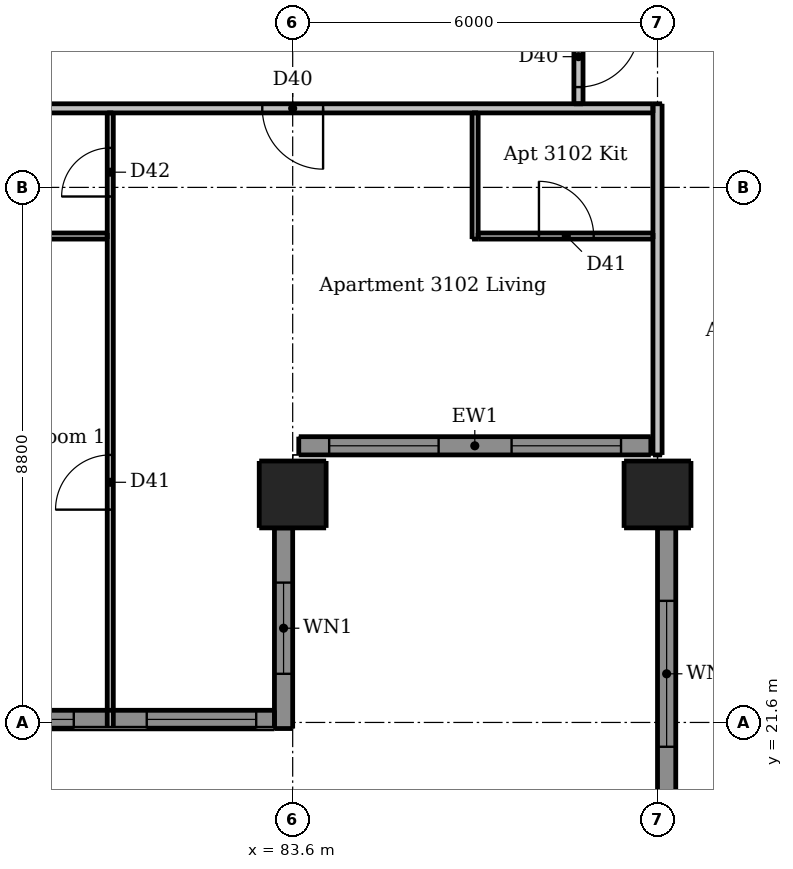
"""IFC4 building model, lengths in metres.
Left out: names, types, materials, properties, quantities, classifications, styles, units other than length and angle.
Written with IfcOpenShell. Run it as: python <this file> out.ifc"""

import sys

from ifc_helpers import new_model, si_unit, direction, frame, frame_2d, origin, origin_2d, place, context, subcontext, project, spatial, rectangle, extrude, element, fill, save


model = new_model("IFC4")
c1 = context("Model", 3, precision=1e-05, world=origin(), true_north=direction((0.0, 1.0)))
c2 = subcontext(c1, "Body", "Model", "MODEL_VIEW")
j1 = project(units=[si_unit("LENGTHUNIT", "METRE"), si_unit("PLANEANGLEUNIT", "RADIAN")], contexts=[c1])
p1 = place(None, origin())
s1 = spatial("IfcSite", under=j1, at=p1, CompositionType="ELEMENT")
p2 = place(p1, origin())
s2 = spatial("IfcBuilding", under=s1, at=p2, CompositionType="ELEMENT")
p3 = place(p2, frame((0.0, 0.0, 115.0)))
s3 = spatial("IfcBuildingStorey", under=s2, at=p3, CompositionType="ELEMENT", Elevation=115.0)
for number, where, z_axis, x_axis in (
    (1, (83.6, 25.35, 0.0), (0.0, 0.0, 1.0), (1.0, 0.0, 0.0)),
    (2, (89.6, 25.35, 0.0), (0.0, 0.0, 1.0), (1.0, 0.0, 0.0)),
):
    element("IfcColumn", number, at=place(p3, frame(where, z_axis=z_axis, x_axis=x_axis)), inside=s3, PredefinedType="COLUMN", context=c2, shape_type="SweptSolid", body=[
        extrude(rectangle(XDim=1.1, YDim=1.1, at=origin_2d()), origin(), (0.0, 0.0, 1.0), 3.05),
    ])
p4 = place(p3, frame((83.45, 21.5, 0.0), z_axis=(0.0, 0.0, 1.0), x_axis=(0.0, 1.0, 0.0)))
e3 = element("IfcWall", 3, at=p4, inside=s3, PredefinedType="SOLIDWALL", context=c2, shape_type="SweptSolid", body=[
    extrude(rectangle(XDim=3.3, YDim=0.3, at=frame_2d((1.65, 0.0))), origin(), (0.0, 0.0, 1.0), 3.05),
])
p5 = place(p4, frame((0.9, 0.0, 0.9)))
e4 = element("IfcOpeningElement", 4, at=p5, cuts=e3, PredefinedType="OPENING", context=c2, shape_type="SweptSolid", body=[
    extrude(rectangle(XDim=1.5, YDim=1.5, at=frame_2d((0.75, 0.75))), frame((0.0, 0.16, 0.0), z_axis=(0.0, -1.0, 0.0), x_axis=(1.0, 0.0, 0.0)), (0.0, 0.0, 1.0), 0.32),
])
p6 = place(p3, frame((89.75, 24.8, 0.0), z_axis=(0.0, 0.0, 1.0), x_axis=(0.0, -1.0, 0.0)))
e5 = element("IfcWall", 5, at=p6, inside=s3, PredefinedType="SOLIDWALL", context=c2, shape_type="SweptSolid", body=[
    extrude(rectangle(XDim=4.8, YDim=0.3, at=frame_2d((2.4, 0.0))), origin(), (0.0, 0.0, 1.0), 3.05),
])
p7 = place(p6, frame((1.2, 0.0, 0.15)))
e6 = element("IfcOpeningElement", 6, at=p7, cuts=e5, PredefinedType="OPENING", context=c2, shape_type="SweptSolid", body=[
    extrude(rectangle(XDim=2.4, YDim=2.1, at=frame_2d((1.2, 1.05))), frame((0.0, 0.16, 0.0), z_axis=(0.0, -1.0, 0.0), x_axis=(1.0, 0.0, 0.0)), (0.0, 0.0, 1.0), 0.32),
])
p8 = place(p3, frame((77.9, 21.65, 0.0), z_axis=(0.0, 0.0, 1.0), x_axis=(1.0, 0.0, 0.0)))
e7 = element("IfcWall", 7, at=p8, inside=s3, PredefinedType="SOLIDWALL", context=c2, shape_type="SweptSolid", body=[
    extrude(rectangle(XDim=5.4, YDim=0.3, at=frame_2d((2.7, 0.0))), origin(), (0.0, 0.0, 1.0), 3.05),
])
p9 = place(p8, frame((0.3, 0.0, 0.15)))
e8 = element("IfcOpeningElement", 8, at=p9, cuts=e7, PredefinedType="OPENING", context=c2, shape_type="SweptSolid", body=[
    extrude(rectangle(XDim=1.8, YDim=2.1, at=frame_2d((0.9, 1.05))), frame((0.0, 0.16, 0.0), z_axis=(0.0, -1.0, 0.0), x_axis=(1.0, 0.0, 0.0)), (0.0, 0.0, 1.0), 0.32),
])
p10 = place(p8, frame((3.3, 0.0, 0.15)))
e9 = element("IfcOpeningElement", 9, at=p10, cuts=e7, PredefinedType="OPENING", context=c2, shape_type="SweptSolid", body=[
    extrude(rectangle(XDim=1.8, YDim=2.1, at=frame_2d((0.9, 1.05))), frame((0.0, 0.16, 0.0), z_axis=(0.0, -1.0, 0.0), x_axis=(1.0, 0.0, 0.0)), (0.0, 0.0, 1.0), 0.32),
])
p11 = place(p3, frame((83.7, 26.15, 0.0), z_axis=(0.0, 0.0, 1.0), x_axis=(1.0, 0.0, 0.0)))
e10 = element("IfcWall", 10, at=p11, inside=s3, PredefinedType="SOLIDWALL", context=c2, shape_type="SweptSolid", body=[
    extrude(rectangle(XDim=5.79, YDim=0.3, at=frame_2d((2.895, 0.0))), origin(), (0.0, 0.0, 1.0), 3.05),
])
p12 = place(p11, frame((0.5, 0.0, 0.15)))
e11 = element("IfcOpeningElement", 11, at=p12, cuts=e10, PredefinedType="OPENING", context=c2, shape_type="SweptSolid", body=[
    extrude(rectangle(XDim=1.8, YDim=2.1, at=frame_2d((0.9, 1.05))), frame((0.0, 0.16, 0.0), z_axis=(0.0, -1.0, 0.0), x_axis=(1.0, 0.0, 0.0)), (0.0, 0.0, 1.0), 0.32),
])
p13 = place(p11, frame((3.5, 0.0, 0.15)))
e12 = element("IfcOpeningElement", 12, at=p13, cuts=e10, PredefinedType="OPENING", context=c2, shape_type="SweptSolid", body=[
    extrude(rectangle(XDim=1.8, YDim=2.1, at=frame_2d((0.9, 1.05))), frame((0.0, 0.16, 0.0), z_axis=(0.0, -1.0, 0.0), x_axis=(1.0, 0.0, 0.0)), (0.0, 0.0, 1.0), 0.32),
])
p14 = place(p3, frame((80.6, 21.5, 0.0), z_axis=(0.0, 0.0, 1.0), x_axis=(0.0, 1.0, 0.0)))
e13 = element("IfcWall", 13, at=p14, inside=s3, PredefinedType="PARTITIONING", context=c2, shape_type="SweptSolid", body=[
    extrude(rectangle(XDim=10.125, YDim=0.1, at=frame_2d((5.062, 0.0))), origin(), (0.0, 0.0, 1.0), 3.05),
])
p15 = place(p14, frame((3.6, 0.0, 0.0)))
e14 = element("IfcOpeningElement", 14, at=p15, cuts=e13, PredefinedType="OPENING", context=c2, shape_type="SweptSolid", body=[
    extrude(rectangle(XDim=0.9, YDim=2.1, at=frame_2d((0.45, 1.05))), frame((0.0, 0.06, 0.0), z_axis=(0.0, -1.0, 0.0), x_axis=(1.0, 0.0, 0.0)), (0.0, 0.0, 1.0), 0.12),
])
p16 = place(p14, frame((8.75, 0.0, 0.0)))
e15 = element("IfcOpeningElement", 15, at=p16, cuts=e13, PredefinedType="OPENING", context=c2, shape_type="SweptSolid", body=[
    extrude(rectangle(XDim=0.8, YDim=2.1, at=frame_2d((0.4, 1.05))), frame((0.0, 0.06, 0.0), z_axis=(0.0, -1.0, 0.0), x_axis=(1.0, 0.0, 0.0)), (0.0, 0.0, 1.0), 0.12),
])
p17 = place(p3, frame((86.6, 29.55, 0.0), z_axis=(0.0, 0.0, 1.0), x_axis=(0.0, 1.0, 0.0)))
e16 = element("IfcWall", 16, at=p17, inside=s3, PredefinedType="PARTITIONING", context=c2, shape_type="SweptSolid", body=[
    extrude(rectangle(XDim=2.075, YDim=0.1, at=frame_2d((1.038, 0.0))), origin(), (0.0, 0.0, 1.0), 3.05),
])
p18 = place(p3, frame((77.05, 29.6, 0.0), z_axis=(0.0, 0.0, 1.0), x_axis=(1.0, 0.0, 0.0)))
e17 = element("IfcWall", 17, at=p18, inside=s3, PredefinedType="PARTITIONING", context=c2, shape_type="SweptSolid", body=[
    extrude(rectangle(XDim=3.5, YDim=0.1, at=frame_2d((1.75, 0.0))), origin(), (0.0, 0.0, 1.0), 3.05),
])
p19 = place(p3, frame((86.65, 29.6, 0.0), z_axis=(0.0, 0.0, 1.0), x_axis=(1.0, 0.0, 0.0)))
e18 = element("IfcWall", 18, at=p19, inside=s3, PredefinedType="PARTITIONING", context=c2, shape_type="SweptSolid", body=[
    extrude(rectangle(XDim=2.875, YDim=0.1, at=frame_2d((1.438, 0.0))), origin(), (0.0, 0.0, 1.0), 3.05),
])
p20 = place(p19, frame((1.0, 0.0, 0.0)))
e19 = element("IfcOpeningElement", 19, at=p20, cuts=e18, PredefinedType="OPENING", context=c2, shape_type="SweptSolid", body=[
    extrude(rectangle(XDim=0.9, YDim=2.1, at=frame_2d((0.45, 1.05))), frame((0.0, 0.06, 0.0), z_axis=(0.0, -1.0, 0.0), x_axis=(1.0, 0.0, 0.0)), (0.0, 0.0, 1.0), 0.12),
])
p21 = place(p3, frame((88.3, 60.475, 0.0), z_axis=(0.0, 0.0, 1.0), x_axis=(0.0, -1.0, 0.0)))
e20 = element("IfcWall", 20, at=p21, inside=s3, PredefinedType="PARTITIONING", context=c2, shape_type="SweptSolid", body=[
    extrude(rectangle(XDim=28.7, YDim=0.15, at=frame_2d((14.35, 0.0))), origin(), (0.0, 0.0, 1.0), 3.05),
])
p22 = place(p21, frame((27.425, 0.0, 0.0)))
e21 = element("IfcOpeningElement", 21, at=p22, cuts=e20, PredefinedType="OPENING", context=c2, shape_type="SweptSolid", body=[
    extrude(rectangle(XDim=1.0, YDim=2.1, at=frame_2d((0.5, 1.05))), frame((0.0, 0.085, 0.0), z_axis=(0.0, -1.0, 0.0), x_axis=(1.0, 0.0, 0.0)), (0.0, 0.0, 1.0), 0.17),
])
p23 = place(p21, frame((13.075, 0.0, 0.0)))
e22 = element("IfcOpeningElement", 22, at=p23, cuts=e20, PredefinedType="OPENING", context=c2, shape_type="SweptSolid", body=[
    extrude(rectangle(XDim=1.0, YDim=2.1, at=frame_2d((0.5, 1.05))), frame((0.0, 0.085, 0.0), z_axis=(0.0, -1.0, 0.0), x_axis=(1.0, 0.0, 0.0)), (0.0, 0.0, 1.0), 0.17),
])
p24 = place(p21, frame((2.575, 0.0, 0.0)))
e23 = element("IfcOpeningElement", 23, at=p24, cuts=e20, PredefinedType="OPENING", context=c2, shape_type="SweptSolid", body=[
    extrude(rectangle(XDim=1.0, YDim=2.1, at=frame_2d((0.5, 1.05))), frame((0.0, 0.085, 0.0), z_axis=(0.0, -1.0, 0.0), x_axis=(1.0, 0.0, 0.0)), (0.0, 0.0, 1.0), 0.17),
])
p25 = place(p3, frame((89.6, 26.0, 0.0), z_axis=(0.0, 0.0, 1.0), x_axis=(0.0, 1.0, 0.0)))
e24 = element("IfcWall", 24, at=p25, inside=s3, PredefinedType="PARTITIONING", context=c2, shape_type="SweptSolid", body=[
    extrude(rectangle(XDim=5.775, YDim=0.15, at=frame_2d((2.887, 0.0))), origin(), (0.0, 0.0, 1.0), 2.516),
])
p26 = place(p3, frame((89.525, 31.7, 0.0), z_axis=(0.0, 0.0, 1.0), x_axis=(-1.0, 0.0, 0.0)))
e25 = element("IfcWall", 25, at=p26, inside=s3, PredefinedType="PARTITIONING", context=c2, shape_type="SweptSolid", body=[
    extrude(rectangle(XDim=28.75, YDim=0.15, at=frame_2d((14.375, 0.0))), origin(), (0.0, 0.0, 1.0), 3.05),
])
p27 = place(p26, frame((24.625, 0.0, 0.0)))
e26 = element("IfcOpeningElement", 26, at=p27, cuts=e25, PredefinedType="OPENING", context=c2, shape_type="SweptSolid", body=[
    extrude(rectangle(XDim=1.0, YDim=2.1, at=frame_2d((0.5, 1.05))), frame((0.0, 0.085, 0.0), z_axis=(0.0, -1.0, 0.0), x_axis=(1.0, 0.0, 0.0)), (0.0, 0.0, 1.0), 0.17),
])
p28 = place(p26, frame((5.425, 0.0, 0.0)))
e27 = element("IfcOpeningElement", 27, at=p28, cuts=e25, PredefinedType="OPENING", context=c2, shape_type="SweptSolid", body=[
    extrude(rectangle(XDim=1.0, YDim=2.1, at=frame_2d((0.5, 1.05))), frame((0.0, 0.085, 0.0), z_axis=(0.0, -1.0, 0.0), x_axis=(1.0, 0.0, 0.0)), (0.0, 0.0, 1.0), 0.17),
])
p29 = place(p5, origin())
e28 = element("IfcWindow", 28, at=p29, inside=s3, PartitioningType="DOUBLE_PANEL_VERTICAL", PredefinedType="WINDOW", context=c2, shape_type="SweptSolid", body=[
    extrude(rectangle(XDim=1.5, YDim=1.5, at=frame_2d((0.75, 0.75))), frame((0.0, 0.03, 0.0), z_axis=(0.0, -1.0, 0.0), x_axis=(1.0, 0.0, 0.0)), (0.0, 0.0, 1.0), 0.06),
])
fill(e4, e28)
p30 = place(p7, origin())
e29 = element("IfcWindow", 29, at=p30, inside=s3, PartitioningType="DOUBLE_PANEL_VERTICAL", PredefinedType="WINDOW", context=c2, shape_type="SweptSolid", body=[
    extrude(rectangle(XDim=2.4, YDim=2.1, at=frame_2d((1.2, 1.05))), frame((0.0, 0.03, 0.0), z_axis=(0.0, -1.0, 0.0), x_axis=(1.0, 0.0, 0.0)), (0.0, 0.0, 1.0), 0.06),
])
fill(e6, e29)
p31 = place(p9, origin())
e30 = element("IfcWindow", 30, at=p31, inside=s3, PartitioningType="DOUBLE_PANEL_VERTICAL", PredefinedType="WINDOW", context=c2, shape_type="SweptSolid", body=[
    extrude(rectangle(XDim=1.8, YDim=2.1, at=frame_2d((0.9, 1.05))), frame((0.0, 0.03, 0.0), z_axis=(0.0, -1.0, 0.0), x_axis=(1.0, 0.0, 0.0)), (0.0, 0.0, 1.0), 0.06),
])
fill(e8, e30)
p32 = place(p10, origin())
e31 = element("IfcWindow", 31, at=p32, inside=s3, PartitioningType="DOUBLE_PANEL_VERTICAL", PredefinedType="WINDOW", context=c2, shape_type="SweptSolid", body=[
    extrude(rectangle(XDim=1.8, YDim=2.1, at=frame_2d((0.9, 1.05))), frame((0.0, 0.03, 0.0), z_axis=(0.0, -1.0, 0.0), x_axis=(1.0, 0.0, 0.0)), (0.0, 0.0, 1.0), 0.06),
])
fill(e9, e31)
p33 = place(p12, origin())
e32 = element("IfcWindow", 32, at=p33, inside=s3, PartitioningType="DOUBLE_PANEL_VERTICAL", PredefinedType="WINDOW", context=c2, shape_type="SweptSolid", body=[
    extrude(rectangle(XDim=1.8, YDim=2.1, at=frame_2d((0.9, 1.05))), frame((0.0, 0.03, 0.0), z_axis=(0.0, -1.0, 0.0), x_axis=(1.0, 0.0, 0.0)), (0.0, 0.0, 1.0), 0.06),
])
fill(e11, e32)
p34 = place(p13, origin())
e33 = element("IfcWindow", 33, at=p34, inside=s3, PartitioningType="DOUBLE_PANEL_VERTICAL", PredefinedType="WINDOW", context=c2, shape_type="SweptSolid", body=[
    extrude(rectangle(XDim=1.8, YDim=2.1, at=frame_2d((0.9, 1.05))), frame((0.0, 0.03, 0.0), z_axis=(0.0, -1.0, 0.0), x_axis=(1.0, 0.0, 0.0)), (0.0, 0.0, 1.0), 0.06),
])
fill(e12, e33)
p35 = place(p28, origin())
e34 = element("IfcDoor", 34, at=p35, inside=s3, OperationType="SINGLE_SWING_LEFT", PredefinedType="DOOR", context=c2, shape_type="SweptSolid", body=[
    extrude(rectangle(XDim=1.0, YDim=2.1, at=frame_2d((0.5, 1.05))), frame((0.0, 0.025, 0.0), z_axis=(0.0, -1.0, 0.0), x_axis=(1.0, 0.0, 0.0)), (0.0, 0.0, 1.0), 0.05),
])
fill(e27, e34)
p36 = place(p20, origin())
e35 = element("IfcDoor", 35, at=p36, inside=s3, OperationType="SINGLE_SWING_LEFT", PredefinedType="DOOR", context=c2, shape_type="SweptSolid", body=[
    extrude(rectangle(XDim=0.9, YDim=2.1, at=frame_2d((0.45, 1.05))), frame((0.0, 0.025, 0.0), z_axis=(0.0, -1.0, 0.0), x_axis=(1.0, 0.0, 0.0)), (0.0, 0.0, 1.0), 0.05),
])
fill(e19, e35)
p37 = place(p15, origin())
e36 = element("IfcDoor", 36, at=p37, inside=s3, OperationType="SINGLE_SWING_LEFT", PredefinedType="DOOR", context=c2, shape_type="SweptSolid", body=[
    extrude(rectangle(XDim=0.9, YDim=2.1, at=frame_2d((0.45, 1.05))), frame((0.0, 0.025, 0.0), z_axis=(0.0, -1.0, 0.0), x_axis=(1.0, 0.0, 0.0)), (0.0, 0.0, 1.0), 0.05),
])
fill(e14, e36)
p38 = place(p16, origin())
e37 = element("IfcDoor", 37, at=p38, inside=s3, OperationType="SINGLE_SWING_LEFT", PredefinedType="DOOR", context=c2, shape_type="SweptSolid", body=[
    extrude(rectangle(XDim=0.8, YDim=2.1, at=frame_2d((0.4, 1.05))), frame((0.0, 0.025, 0.0), z_axis=(0.0, -1.0, 0.0), x_axis=(1.0, 0.0, 0.0)), (0.0, 0.0, 1.0), 0.05),
])
fill(e15, e37)
p39 = place(p22, origin())
e38 = element("IfcDoor", 38, at=p39, inside=s3, OperationType="SINGLE_SWING_LEFT", PredefinedType="DOOR", context=c2, shape_type="SweptSolid", body=[
    extrude(rectangle(XDim=1.0, YDim=2.1, at=frame_2d((0.5, 1.05))), frame((0.0, 0.025, 0.0), z_axis=(0.0, -1.0, 0.0), x_axis=(1.0, 0.0, 0.0)), (0.0, 0.0, 1.0), 0.05),
])
fill(e21, e38)
save(model, sys.argv[1])
